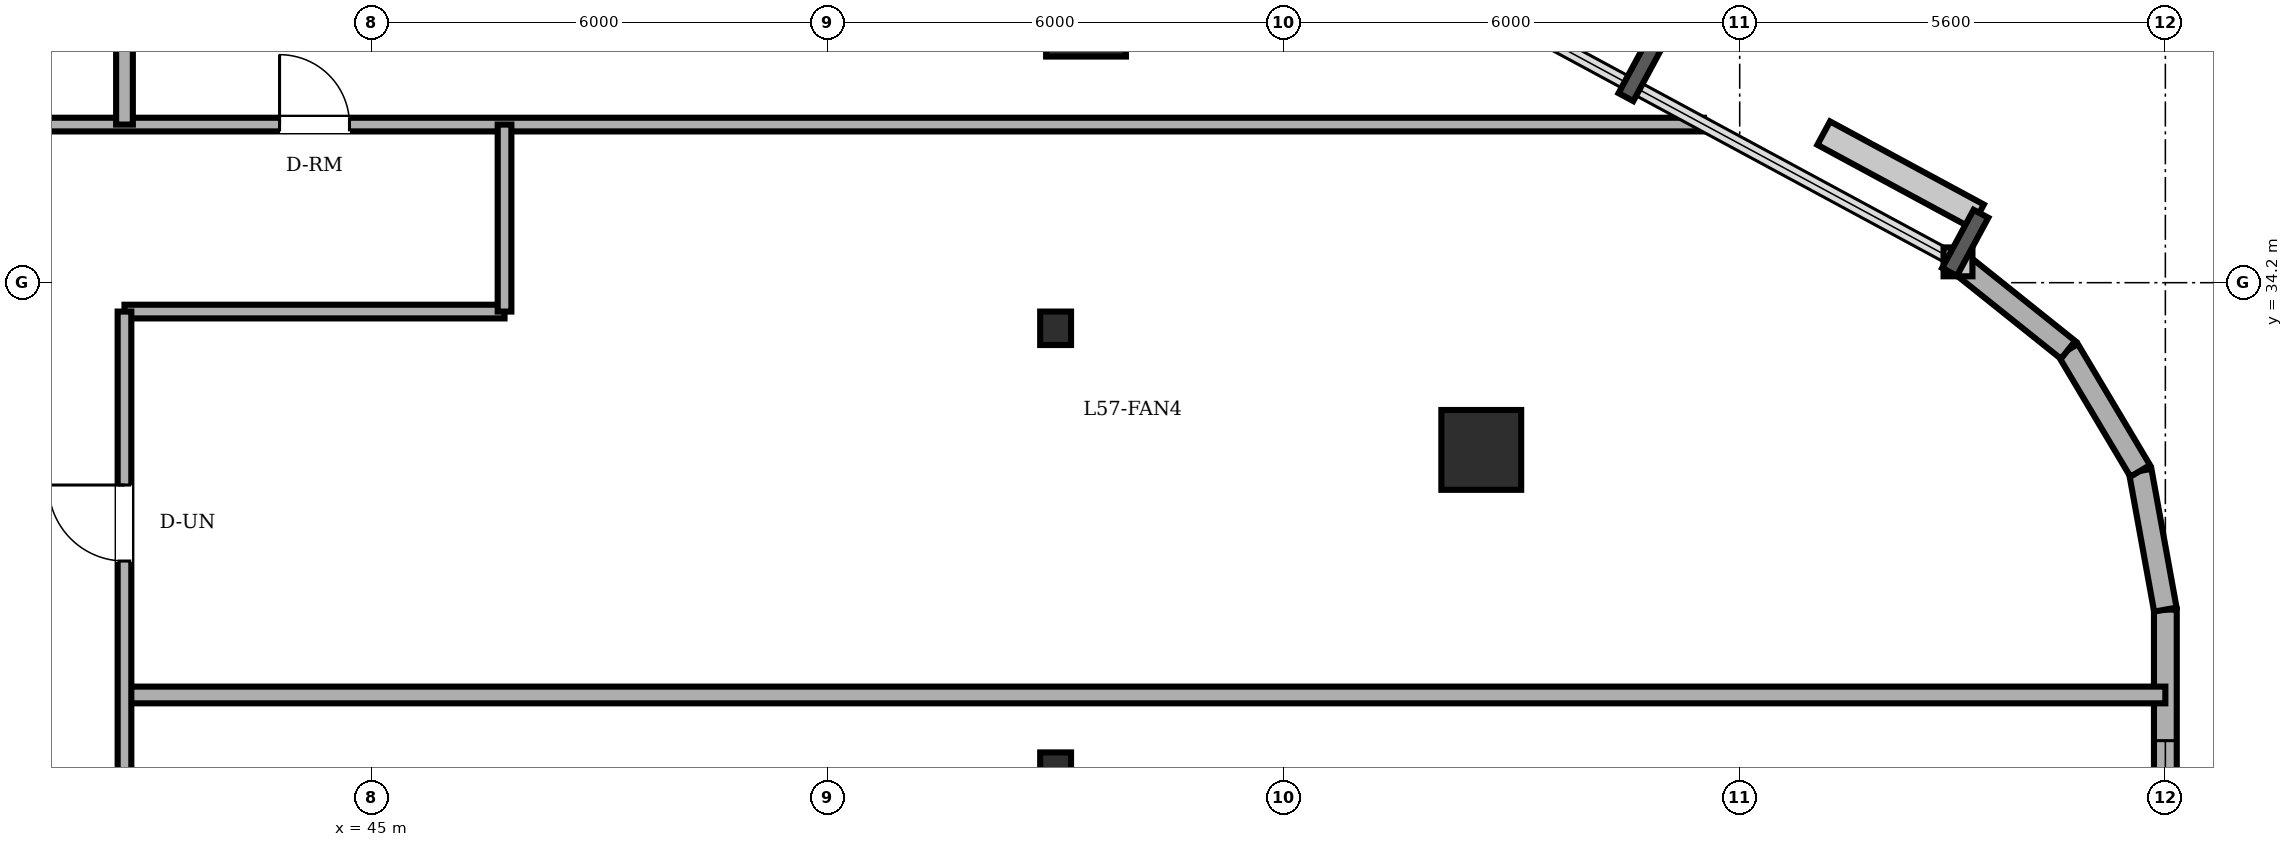
"""IFC4 building model, lengths in metres.
Left out: names, types, materials, properties, quantities, classifications, styles, units other than length and angle.
Written with IfcOpenShell. Run it as: python <this file> out.ifc"""

import sys

from ifc_helpers import new_model, si_unit, direction, frame, frame_2d, origin, origin_2d, place, context, subcontext, project, spatial, rectangle, circle, i_section, extrude, element, fill, save


model = new_model("IFC4")
c1 = context("Model", 3, precision=1e-05, world=origin(), true_north=direction((0.0, 1.0)))
c2 = subcontext(c1, "Body", "Model", "MODEL_VIEW")
j1 = project(units=[si_unit("LENGTHUNIT", "METRE"), si_unit("PLANEANGLEUNIT", "RADIAN")], contexts=[c1])
p1 = place(None, origin())
s1 = spatial("IfcSite", under=j1, at=p1, CompositionType="ELEMENT")
p2 = place(p1, origin())
s2 = spatial("IfcBuilding", under=s1, at=p2, CompositionType="ELEMENT")
p3 = place(p2, frame((0.0, 0.0, 219.3)))
s3 = spatial("IfcBuildingStorey", under=s2, at=p3, CompositionType="ELEMENT", Elevation=219.3)
for number, where, z_axis, x_axis in (
    (1, (59.6, 32.0, 0.0), (0.0, 0.0, 1.0), (1.0, 0.0, 0.0)),
    (2, (54.4, 37.7, 0.0), (0.0, 0.0, 1.0), (1.0, 0.0, 0.0)),
):
    element("IfcColumn", number, at=place(p3, frame(where, z_axis=z_axis, x_axis=x_axis)), inside=s3, PredefinedType="COLUMN", context=c2, shape_type="SweptSolid", body=[
        extrude(circle(Radius=0.525, at=origin_2d()), origin(), (0.0, 0.0, 1.0), 3.6),
    ])
for number, where, z_axis, x_axis in (
    (3, (54.0, 27.8, 0.0), (0.0, 0.0, 1.0), (1.0, 0.0, 0.0)),
    (4, (54.0, 33.6, 0.0), (0.0, 0.0, 1.0), (1.0, 0.0, 0.0)),
):
    element("IfcColumn", number, at=place(p3, frame(where, z_axis=z_axis, x_axis=x_axis)), inside=s3, PredefinedType="COLUMN", context=c2, shape_type="SweptSolid", body=[
        extrude(i_section(OverallWidth=0.406, OverallDepth=0.44, WebThickness=0.024, FlangeThickness=0.039, FilletRadius=0.015, at=origin_2d()), origin(), (0.0, 0.0, 1.0), 3.6),
    ])
p4 = place(p3, frame((68.6, 25.4, 0.0), z_axis=(0.0, 0.0, 1.0), x_axis=(0.0, 1.0, 0.0)))
e5 = element("IfcWall", 5, at=p4, inside=s3, PredefinedType="SOLIDWALL", context=c2, shape_type="SweptSolid", body=[
    extrude(rectangle(XDim=4.499, YDim=0.3, at=frame_2d((2.25, 0.0))), origin(), (0.0, 0.0, 1.0), 3.4),
])
p5 = place(p4, frame((1.725, 0.0, 0.85)))
e6 = element("IfcOpeningElement", 6, at=p5, cuts=e5, PredefinedType="OPENING", context=c2, shape_type="SweptSolid", body=[
    extrude(rectangle(XDim=1.05, YDim=1.55, at=frame_2d((0.525, 0.775))), frame((0.0, 0.16, 0.0), z_axis=(0.0, -1.0, 0.0), x_axis=(1.0, 0.0, 0.0)), (0.0, 0.0, 1.0), 0.32),
])
p6 = place(p3, frame((68.6, 29.899, 0.0), z_axis=(0.0, 0.0, 1.0), x_axis=(-0.178468469252, 0.983945631365, 0.0)))
e7 = element("IfcWall", 7, at=p6, inside=s3, PredefinedType="SOLIDWALL", context=c2, shape_type="SweptSolid", body=[
    extrude(rectangle(XDim=1.855, YDim=0.3, at=frame_2d((0.927, 0.0))), origin(), (0.0, 0.0, 1.0), 3.4),
])
p7 = place(p3, frame((68.269, 31.724, 0.0), z_axis=(0.0, 0.0, 1.0), x_axis=(-0.512072018927, 0.858942516955, 0.0)))
e8 = element("IfcWall", 8, at=p7, inside=s3, PredefinedType="SOLIDWALL", context=c2, shape_type="SweptSolid", body=[
    extrude(rectangle(XDim=1.853, YDim=0.3, at=frame_2d((0.927, 0.0))), origin(), (0.0, 0.0, 1.0), 3.4),
])
p8 = place(p3, frame((67.32, 33.316, 0.0), z_axis=(0.0, 0.0, 1.0), x_axis=(-0.780920189257, 0.624630817372, 0.0)))
e9 = element("IfcWall", 9, at=p8, inside=s3, PredefinedType="SOLIDWALL", context=c2, shape_type="SweptSolid", body=[
    extrude(rectangle(XDim=1.854, YDim=0.3, at=frame_2d((0.927, 0.0))), origin(), (0.0, 0.0, 1.0), 3.4),
])
p9 = place(p3, frame((41.75, 28.776, 0.0), z_axis=(0.0, 0.0, 1.0), x_axis=(1.0, 0.0, 0.0)))
e10 = element("IfcWall", 10, at=p9, inside=s3, PredefinedType="PARTITIONING", context=c2, shape_type="SweptSolid", body=[
    extrude(rectangle(XDim=26.85, YDim=0.22, at=frame_2d((13.425, 0.0))), origin(), (0.0, 0.0, 1.0), 3.4),
])
p10 = place(p3, frame((41.75, 33.82, 0.0), z_axis=(0.0, 0.0, 1.0), x_axis=(1.0, 0.0, 0.0)))
e11 = element("IfcWall", 11, at=p10, inside=s3, PredefinedType="PARTITIONING", context=c2, shape_type="SweptSolid", body=[
    extrude(rectangle(XDim=5.0, YDim=0.18, at=frame_2d((2.5, 0.0))), origin(), (0.0, 0.0, 1.0), 2.982),
])
p11 = place(p3, frame((17.677, 36.28, 0.0), z_axis=(0.0, 0.0, 1.0), x_axis=(1.0, 0.0, 0.0)))
e12 = element("IfcWall", 12, at=p11, inside=s3, PredefinedType="PARTITIONING", context=c2, shape_type="SweptSolid", body=[
    extrude(rectangle(XDim=44.853, YDim=0.18, at=frame_2d((22.427, 0.0))), origin(), (0.0, 0.0, 1.0), 3.4),
])
p12 = place(p11, frame((9.573, 0.0, 0.0)))
e13 = element("IfcOpeningElement", 13, at=p12, cuts=e12, PredefinedType="OPENING", context=c2, shape_type="SweptSolid", body=[
    extrude(rectangle(XDim=0.9, YDim=2.1, at=frame_2d((0.45, 1.05))), frame((0.0, 0.1, 0.0), z_axis=(0.0, -1.0, 0.0), x_axis=(1.0, 0.0, 0.0)), (0.0, 0.0, 1.0), 0.2),
])
p13 = place(p11, frame((13.193, 0.0, 0.0)))
e14 = element("IfcOpeningElement", 14, at=p13, cuts=e12, PredefinedType="OPENING", context=c2, shape_type="SweptSolid", body=[
    extrude(rectangle(XDim=0.86, YDim=2.1, at=frame_2d((0.43, 1.05))), frame((0.0, 0.1, 0.0), z_axis=(0.0, -1.0, 0.0), x_axis=(1.0, 0.0, 0.0)), (0.0, 0.0, 1.0), 0.2),
])
p14 = place(p11, frame((26.113, 0.0, 0.0)))
e15 = element("IfcOpeningElement", 15, at=p14, cuts=e12, PredefinedType="OPENING", context=c2, shape_type="SweptSolid", body=[
    extrude(rectangle(XDim=0.92, YDim=2.1, at=frame_2d((0.46, 1.05))), frame((0.0, 0.1, 0.0), z_axis=(0.0, -1.0, 0.0), x_axis=(1.0, 0.0, 0.0)), (0.0, 0.0, 1.0), 0.2),
])
p15 = place(p11, frame((4.063, 0.0, 0.0)))
e16 = element("IfcOpeningElement", 16, at=p15, cuts=e12, PredefinedType="OPENING", context=c2, shape_type="SweptSolid", body=[
    extrude(rectangle(XDim=0.92, YDim=2.1, at=frame_2d((0.46, 1.05))), frame((0.0, 0.1, 0.0), z_axis=(0.0, -1.0, 0.0), x_axis=(1.0, 0.0, 0.0)), (0.0, 0.0, 1.0), 0.2),
])
p16 = place(p11, frame((19.338, 0.0, 0.0)))
e17 = element("IfcOpeningElement", 17, at=p16, cuts=e12, PredefinedType="OPENING", context=c2, shape_type="SweptSolid", body=[
    extrude(rectangle(XDim=0.92, YDim=2.1, at=frame_2d((0.46, 1.05))), frame((0.0, 0.1, 0.0), z_axis=(0.0, -1.0, 0.0), x_axis=(1.0, 0.0, 0.0)), (0.0, 0.0, 1.0), 0.2),
])
p17 = place(p3, frame((41.75, 14.18, 0.0), z_axis=(0.0, 0.0, 1.0), x_axis=(0.0, 1.0, 0.0)))
e18 = element("IfcWall", 18, at=p17, inside=s3, PredefinedType="PARTITIONING", context=c2, shape_type="SweptSolid", body=[
    extrude(rectangle(XDim=19.64, YDim=0.18, at=frame_2d((9.82, 0.0))), origin(), (0.0, 0.0, 1.0), 3.4),
])
p18 = place(p17, frame((2.322, 0.0, 0.0)))
e19 = element("IfcOpeningElement", 19, at=p18, cuts=e18, PredefinedType="OPENING", context=c2, shape_type="SweptSolid", body=[
    extrude(rectangle(XDim=0.92, YDim=2.1, at=frame_2d((0.46, 1.05))), frame((0.0, 0.1, 0.0), z_axis=(0.0, -1.0, 0.0), x_axis=(1.0, 0.0, 0.0)), (0.0, 0.0, 1.0), 0.2),
])
p19 = place(p17, frame((6.517, 0.0, 0.0)))
e20 = element("IfcOpeningElement", 20, at=p19, cuts=e18, PredefinedType="OPENING", context=c2, shape_type="SweptSolid", body=[
    extrude(rectangle(XDim=0.92, YDim=2.1, at=frame_2d((0.46, 1.05))), frame((0.0, 0.1, 0.0), z_axis=(0.0, -1.0, 0.0), x_axis=(1.0, 0.0, 0.0)), (0.0, 0.0, 1.0), 0.2),
])
p20 = place(p17, frame((11.293, 0.0, 0.0)))
e21 = element("IfcOpeningElement", 21, at=p20, cuts=e18, PredefinedType="OPENING", context=c2, shape_type="SweptSolid", body=[
    extrude(rectangle(XDim=0.92, YDim=2.1, at=frame_2d((0.46, 1.05))), frame((0.0, 0.1, 0.0), z_axis=(0.0, -1.0, 0.0), x_axis=(1.0, 0.0, 0.0)), (0.0, 0.0, 1.0), 0.2),
])
p21 = place(p17, frame((16.358, 0.0, 0.0)))
e22 = element("IfcOpeningElement", 22, at=p21, cuts=e18, PredefinedType="OPENING", context=c2, shape_type="SweptSolid", body=[
    extrude(rectangle(XDim=1.0, YDim=2.15, at=frame_2d((0.5, 1.075))), frame((0.0, 0.1, 0.0), z_axis=(0.0, -1.0, 0.0), x_axis=(1.0, 0.0, 0.0)), (0.0, 0.0, 1.0), 0.2),
])
p22 = place(p3, frame((41.75, 36.28, 0.0), z_axis=(0.0, 0.0, 1.0), x_axis=(0.0, 1.0, 0.0)))
e23 = element("IfcWall", 23, at=p22, inside=s3, PredefinedType="PARTITIONING", context=c2, shape_type="SweptSolid", body=[
    extrude(rectangle(XDim=3.42, YDim=0.22, at=frame_2d((1.71, 0.0))), origin(), (0.0, 0.0, 1.0), 3.4),
])
p23 = place(p3, frame((46.75, 33.82, 0.0), z_axis=(0.0, 0.0, 1.0), x_axis=(0.0, 1.0, 0.0)))
e24 = element("IfcWall", 24, at=p23, inside=s3, PredefinedType="PARTITIONING", context=c2, shape_type="SweptSolid", body=[
    extrude(rectangle(XDim=2.46, YDim=0.18, at=frame_2d((1.23, 0.0))), origin(), (0.0, 0.0, 1.0), 3.4),
])
p24 = place(p5, origin())
e25 = element("IfcWindow", 25, at=p24, inside=s3, PartitioningType="SINGLE_PANEL", PredefinedType="WINDOW", context=c2, shape_type="SweptSolid", body=[
    extrude(rectangle(XDim=1.05, YDim=1.55, at=frame_2d((0.525, 0.775))), frame((0.0, 0.03, 0.0), z_axis=(0.0, -1.0, 0.0), x_axis=(1.0, 0.0, 0.0)), (0.0, 0.0, 1.0), 0.06),
])
fill(e6, e25)
p25 = place(p21, origin())
e26 = element("IfcDoor", 26, at=p25, inside=s3, OperationType="SINGLE_SWING_RIGHT", PredefinedType="DOOR", context=c2, shape_type="SweptSolid", body=[
    extrude(rectangle(XDim=1.0, YDim=2.15, at=frame_2d((0.5, 1.075))), frame((0.0, 0.025, 0.0), z_axis=(0.0, -1.0, 0.0), x_axis=(1.0, 0.0, 0.0)), (0.0, 0.0, 1.0), 0.05),
])
fill(e22, e26)
p26 = place(p14, origin())
e27 = element("IfcDoor", 27, at=p26, inside=s3, OperationType="SINGLE_SWING_LEFT", PredefinedType="DOOR", context=c2, shape_type="SweptSolid", body=[
    extrude(rectangle(XDim=0.92, YDim=2.1, at=frame_2d((0.46, 1.05))), frame((0.0, 0.025, 0.0), z_axis=(0.0, -1.0, 0.0), x_axis=(1.0, 0.0, 0.0)), (0.0, 0.0, 1.0), 0.05),
])
fill(e15, e27)
save(model, sys.argv[1])
